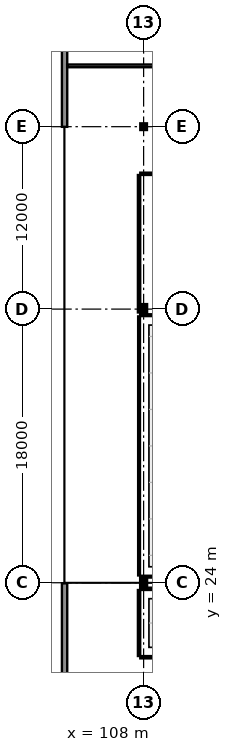
"""IFC4 building model, lengths in metres.
Left out: names, types, materials, properties, quantities, classifications, styles, units other than length and angle.
Written with IfcOpenShell. Run it as: python <this file> out.ifc"""

import sys

from ifc_helpers import new_model, si_unit, direction, frame, frame_2d, origin, origin_2d, place, context, subcontext, project, spatial, rectangle, i_section, extrude, element, fill, save


model = new_model("IFC4")
c1 = context("Model", 3, precision=1e-05, world=origin(), true_north=direction((0.0, 1.0)))
c2 = subcontext(c1, "Body", "Model", "MODEL_VIEW")
j1 = project(units=[si_unit("LENGTHUNIT", "METRE"), si_unit("PLANEANGLEUNIT", "RADIAN")], contexts=[c1])
p1 = place(None, origin())
s1 = spatial("IfcSite", under=j1, at=p1, CompositionType="ELEMENT")
p2 = place(p1, origin())
s2 = spatial("IfcBuilding", under=s1, at=p2, CompositionType="ELEMENT")
p3 = place(p2, origin())
s3 = spatial("IfcBuildingStorey", under=s2, at=p3, CompositionType="ELEMENT", Elevation=0.0)
p4 = place(p3, frame((108.0, 24.0, 0.0), z_axis=(0.0, 0.0, 1.0), x_axis=(1.0, 0.0, 0.0)))
e1 = element("IfcColumn", 1, at=p4, inside=s3, PredefinedType="COLUMN", context=c2, shape_type="SweptSolid", body=[
    extrude(i_section(OverallWidth=0.3, OverallDepth=0.65, WebThickness=0.016, FlangeThickness=0.031, at=origin_2d()), origin(), (0.0, 0.0, 1.0), 5.4),
])
p5 = place(p3, frame((108.0, 42.0, 0.0), z_axis=(0.0, 0.0, 1.0), x_axis=(1.0, 0.0, 0.0)))
e2 = element("IfcColumn", 2, at=p5, inside=s3, PredefinedType="COLUMN", context=c2, shape_type="SweptSolid", body=[
    extrude(i_section(OverallWidth=0.3, OverallDepth=0.5, WebThickness=0.014, FlangeThickness=0.028, at=origin_2d()), origin(), (0.0, 0.0, 1.0), 5.4),
])
p6 = place(p3, frame((108.0, 54.0, 0.0), z_axis=(0.0, 0.0, 1.0), x_axis=(1.0, 0.0, 0.0)))
e3 = element("IfcColumn", 3, at=p6, inside=s3, PredefinedType="COLUMN", context=c2, shape_type="SweptSolid", body=[
    extrude(i_section(OverallWidth=0.28, OverallDepth=0.28, WebThickness=0.01, FlangeThickness=0.018, at=origin_2d()), origin(), (0.0, 0.0, 1.0), 5.4),
])
p7 = place(p3, frame((102.8, 65.96, 0.0), z_axis=(0.0, 0.0, 1.0), x_axis=(0.0, -1.0, 0.0)))
e4 = element("IfcWall", 4, at=p7, inside=s3, PredefinedType="SOLIDWALL", context=c2, shape_type="SweptSolid", body=[
    extrude(rectangle(XDim=11.97, YDim=0.35, at=frame_2d((5.985, 0.0))), origin(), (0.0, 0.0, 1.0), 5.08),
])
p8 = place(p7, frame((4.96, 0.0, 0.0)))
e5 = element("IfcOpeningElement", 5, at=p8, cuts=e4, PredefinedType="OPENING", context=c2, shape_type="SweptSolid", body=[
    extrude(rectangle(XDim=2.0, YDim=2.5, at=frame_2d((1.0, 1.25))), frame((0.0, 0.19, 0.0), z_axis=(0.0, -1.0, 0.0), x_axis=(1.0, 0.0, 0.0)), (0.0, 0.0, 1.0), 0.38),
])
p9 = place(p3, frame((102.8, 23.96, 0.0), z_axis=(0.0, 0.0, 1.0), x_axis=(0.0, -1.0, 0.0)))
e6 = element("IfcWall", 6, at=p9, inside=s3, PredefinedType="SOLIDWALL", context=c2, shape_type="SweptSolid", body=[
    extrude(rectangle(XDim=11.97, YDim=0.35, at=frame_2d((5.985, 0.0))), origin(), (0.0, 0.0, 1.0), 5.08),
])
p10 = place(p9, frame((5.2, 0.0, 0.85)))
e7 = element("IfcOpeningElement", 7, at=p10, cuts=e6, PredefinedType="OPENING", context=c2, shape_type="SweptSolid", body=[
    extrude(rectangle(XDim=2.2, YDim=1.4, at=frame_2d((1.1, 0.7))), frame((0.0, 0.19, 0.0), z_axis=(0.0, -1.0, 0.0), x_axis=(1.0, 0.0, 0.0)), (0.0, 0.0, 1.0), 0.38),
])
p11 = place(p3, frame((111.32, 58.0, 0.0), z_axis=(0.0, 0.0, 1.0), x_axis=(-1.0, 0.0, 0.0)))
e8 = element("IfcWall", 8, at=p11, inside=s3, PredefinedType="PARTITIONING", context=c2, shape_type="SweptSolid", body=[
    extrude(rectangle(XDim=8.35, YDim=0.18, at=frame_2d((4.175, 0.0))), origin(), (0.0, 0.0, 1.0), 5.04),
])
p12 = place(p11, frame((3.45, 0.0, 0.0)))
e9 = element("IfcOpeningElement", 9, at=p12, cuts=e8, PredefinedType="OPENING", context=c2, shape_type="SweptSolid", body=[
    extrude(rectangle(XDim=1.45, YDim=2.2, at=frame_2d((0.725, 1.1))), frame((0.0, 0.105, 0.0), z_axis=(0.0, -1.0, 0.0), x_axis=(1.0, 0.0, 0.0)), (0.0, 0.0, 1.0), 0.21),
])
p13 = place(p3, frame((143.83, 24.4, 0.0), z_axis=(0.0, 0.0, 1.0), x_axis=(-1.0, 0.0, 0.0)))
e10 = element("IfcWall", 10, at=p13, inside=s3, PredefinedType="PARTITIONING", context=c2, shape_type="SweptSolid", body=[
    extrude(rectangle(XDim=36.05, YDim=0.12, at=frame_2d((18.025, 0.0))), origin(), (0.0, 0.0, 1.0), 5.04),
])
p14 = place(p3, frame((107.7, 24.48, 0.0), z_axis=(0.0, 0.0, 1.0), x_axis=(0.0, 1.0, 0.0)))
e11 = element("IfcWall", 11, at=p14, inside=s3, PredefinedType="PARTITIONING", context=c2, shape_type="SweptSolid", body=[
    extrude(rectangle(XDim=17.04, YDim=0.12, at=frame_2d((8.52, 0.0))), origin(), (0.0, 0.0, 1.0), 5.04),
])
p15 = place(p14, frame((8.07, 0.0, 0.0)))
e12 = element("IfcOpeningElement", 12, at=p15, cuts=e11, PredefinedType="OPENING", context=c2, shape_type="SweptSolid", body=[
    extrude(rectangle(XDim=0.9, YDim=2.1, at=frame_2d((0.45, 1.05))), frame((0.0, 0.075, 0.0), z_axis=(0.0, -1.0, 0.0), x_axis=(1.0, 0.0, 0.0)), (0.0, 0.0, 1.0), 0.15),
])
p16 = place(p14, frame((14.09, 0.0, 1.05)))
e13 = element("IfcOpeningElement", 13, at=p16, cuts=e11, PredefinedType="OPENING", context=c2, shape_type="SweptSolid", body=[
    extrude(rectangle(XDim=2.1, YDim=1.2, at=frame_2d((1.05, 0.6))), frame((0.0, 0.075, 0.0), z_axis=(0.0, -1.0, 0.0), x_axis=(1.0, 0.0, 0.0)), (0.0, 0.0, 1.0), 0.15),
])
p17 = place(p3, frame((107.78, 41.6, 0.0), z_axis=(0.0, 0.0, 1.0), x_axis=(1.0, 0.0, 0.0)))
e14 = element("IfcWall", 14, at=p17, inside=s3, PredefinedType="PARTITIONING", context=c2, shape_type="SweptSolid", body=[
    extrude(rectangle(XDim=36.212, YDim=0.12, at=frame_2d((18.106, 0.0))), origin(), (0.0, 0.0, 1.0), 5.04),
])
p18 = place(p3, frame((107.78, 50.9, 0.0), z_axis=(0.0, 0.0, 1.0), x_axis=(1.0, 0.0, 0.0)))
e15 = element("IfcWall", 15, at=p18, inside=s3, PredefinedType="PARTITIONING", context=c2, shape_type="SweptSolid", body=[
    extrude(rectangle(XDim=8.64, YDim=0.15, at=frame_2d((4.32, 0.0))), origin(), (0.0, 0.0, 1.0), 5.04),
])
p19 = place(p3, frame((107.7, 41.78, 0.0), z_axis=(0.0, 0.0, 1.0), x_axis=(0.0, 1.0, 0.0)))
e16 = element("IfcWall", 16, at=p19, inside=s3, PredefinedType="PARTITIONING", context=c2, shape_type="SweptSolid", body=[
    extrude(rectangle(XDim=9.04, YDim=0.15, at=frame_2d((4.52, 0.0))), origin(), (0.0, 0.0, 1.0), 5.04),
])
p20 = place(p19, frame((3.995, 0.0, 0.0)))
e17 = element("IfcOpeningElement", 17, at=p20, cuts=e16, PredefinedType="OPENING", context=c2, shape_type="SweptSolid", body=[
    extrude(rectangle(XDim=1.05, YDim=2.25, at=frame_2d((0.525, 1.125))), frame((0.0, 0.09, 0.0), z_axis=(0.0, -1.0, 0.0), x_axis=(1.0, 0.0, 0.0)), (0.0, 0.0, 1.0), 0.18),
])
p21 = place(p19, frame((6.39, 0.0, 1.05)))
e18 = element("IfcOpeningElement", 18, at=p21, cuts=e16, PredefinedType="OPENING", context=c2, shape_type="SweptSolid", body=[
    extrude(rectangle(XDim=1.8, YDim=1.1, at=frame_2d((0.9, 0.55))), frame((0.0, 0.09, 0.0), z_axis=(0.0, -1.0, 0.0), x_axis=(1.0, 0.0, 0.0)), (0.0, 0.0, 1.0), 0.18),
])
p22 = place(p3, frame((111.92, 19.1, 0.0), z_axis=(0.0, 0.0, 1.0), x_axis=(-1.0, 0.0, 0.0)))
e19 = element("IfcWall", 19, at=p22, inside=s3, PredefinedType="PARTITIONING", context=c2, shape_type="SweptSolid", body=[
    extrude(rectangle(XDim=4.14, YDim=0.15, at=frame_2d((2.07, 0.0))), origin(), (0.0, 0.0, 1.0), 5.04),
])
p23 = place(p3, frame((107.7, 19.18, 0.0), z_axis=(0.0, 0.0, 1.0), x_axis=(0.0, 1.0, 0.0)))
e20 = element("IfcWall", 20, at=p23, inside=s3, PredefinedType="PARTITIONING", context=c2, shape_type="SweptSolid", body=[
    extrude(rectangle(XDim=4.34, YDim=0.15, at=frame_2d((2.17, 0.0))), origin(), (0.0, 0.0, 1.0), 5.04),
])
p24 = place(p23, frame((1.645, 0.0, 0.0)))
e21 = element("IfcOpeningElement", 21, at=p24, cuts=e20, PredefinedType="OPENING", context=c2, shape_type="SweptSolid", body=[
    extrude(rectangle(XDim=1.05, YDim=2.25, at=frame_2d((0.525, 1.125))), frame((0.0, 0.09, 0.0), z_axis=(0.0, -1.0, 0.0), x_axis=(1.0, 0.0, 0.0)), (0.0, 0.0, 1.0), 0.18),
])
p25 = place(p3, frame((107.78, 23.6, 0.0), z_axis=(0.0, 0.0, 1.0), x_axis=(1.0, 0.0, 0.0)))
e22 = element("IfcWall", 22, at=p25, inside=s3, PredefinedType="PARTITIONING", context=c2, shape_type="SweptSolid", body=[
    extrude(rectangle(XDim=27.212, YDim=0.15, at=frame_2d((13.606, 0.0))), origin(), (0.0, 0.0, 1.0), 5.04),
])
p26 = place(p10, origin())
e23 = element("IfcWindow", 23, at=p26, inside=s3, PartitioningType="SINGLE_PANEL", PredefinedType="WINDOW", context=c2, shape_type="SweptSolid", body=[
    extrude(rectangle(XDim=2.2, YDim=1.4, at=frame_2d((1.1, 0.7))), frame((0.0, 0.03, 0.0), z_axis=(0.0, -1.0, 0.0), x_axis=(1.0, 0.0, 0.0)), (0.0, 0.0, 1.0), 0.06),
])
fill(e7, e23)
p27 = place(p12, origin())
e24 = element("IfcDoor", 24, at=p27, inside=s3, OperationType="DOUBLE_DOOR_SINGLE_SWING", PredefinedType="DOOR", context=c2, shape_type="SweptSolid", body=[
    extrude(rectangle(XDim=1.45, YDim=2.2, at=frame_2d((0.725, 1.1))), frame((0.0, 0.025, 0.0), z_axis=(0.0, -1.0, 0.0), x_axis=(1.0, 0.0, 0.0)), (0.0, 0.0, 1.0), 0.05),
])
fill(e9, e24)
p28 = place(p15, origin())
e25 = element("IfcDoor", 25, at=p28, inside=s3, OperationType="SINGLE_SWING_LEFT", PredefinedType="DOOR", context=c2, shape_type="SweptSolid", body=[
    extrude(rectangle(XDim=0.9, YDim=2.1, at=frame_2d((0.45, 1.05))), frame((0.0, 0.025, 0.0), z_axis=(0.0, -1.0, 0.0), x_axis=(1.0, 0.0, 0.0)), (0.0, 0.0, 1.0), 0.05),
])
fill(e12, e25)
p29 = place(p16, origin())
e26 = element("IfcWindow", 26, at=p29, inside=s3, PartitioningType="SINGLE_PANEL", PredefinedType="WINDOW", context=c2, shape_type="SweptSolid", body=[
    extrude(rectangle(XDim=2.1, YDim=1.2, at=frame_2d((1.05, 0.6))), frame((0.0, 0.03, 0.0), z_axis=(0.0, -1.0, 0.0), x_axis=(1.0, 0.0, 0.0)), (0.0, 0.0, 1.0), 0.06),
])
fill(e13, e26)
p30 = place(p20, frame((1.05, 0.0, 0.0), z_axis=(0.0, 0.0, 1.0), x_axis=(-1.0, 0.0, 0.0)))
e27 = element("IfcDoor", 27, at=p30, inside=s3, OperationType="SINGLE_SWING_RIGHT", PredefinedType="DOOR", context=c2, shape_type="SweptSolid", body=[
    extrude(rectangle(XDim=1.05, YDim=2.25, at=frame_2d((0.525, 1.125))), frame((0.0, 0.025, 0.0), z_axis=(0.0, -1.0, 0.0), x_axis=(1.0, 0.0, 0.0)), (0.0, 0.0, 1.0), 0.05),
])
fill(e17, e27)
p31 = place(p21, origin())
e28 = element("IfcWindow", 28, at=p31, inside=s3, PartitioningType="SINGLE_PANEL", PredefinedType="WINDOW", context=c2, shape_type="SweptSolid", body=[
    extrude(rectangle(XDim=1.8, YDim=1.1, at=frame_2d((0.9, 0.55))), frame((0.0, 0.03, 0.0), z_axis=(0.0, -1.0, 0.0), x_axis=(1.0, 0.0, 0.0)), (0.0, 0.0, 1.0), 0.06),
])
fill(e18, e28)
p32 = place(p24, origin())
e29 = element("IfcDoor", 29, at=p32, inside=s3, OperationType="SINGLE_SWING_RIGHT", PredefinedType="DOOR", context=c2, shape_type="SweptSolid", body=[
    extrude(rectangle(XDim=1.05, YDim=2.25, at=frame_2d((0.525, 1.125))), frame((0.0, 0.025, 0.0), z_axis=(0.0, -1.0, 0.0), x_axis=(1.0, 0.0, 0.0)), (0.0, 0.0, 1.0), 0.05),
])
fill(e21, e29)
save(model, sys.argv[1])
